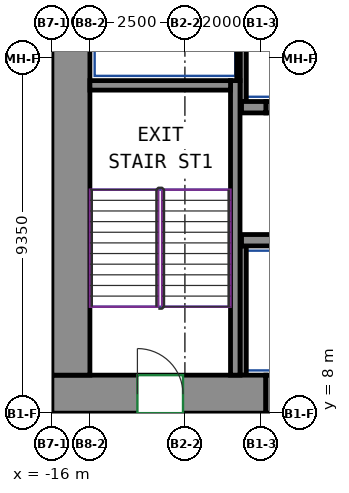
"""IFC4 building model, lengths in metres.
Left out: names, types, materials, properties, quantities, classifications, styles, units other than length and angle.
Written with IfcOpenShell. Run it as: python <this file> out.ifc"""

import sys

from ifc_helpers import new_model, si_unit, direction, frame, frame_2d, origin, place, context, subcontext, project, spatial, rectangle, extrude, source, transform, mapped, element, fill, save


model = new_model("IFC4")
c1 = context("Model", 3, precision=1e-05, world=origin(), true_north=direction((0.0, 1.0)))
c2 = subcontext(c1, "Body", "Model", "MODEL_VIEW")
j1 = project(units=[si_unit("LENGTHUNIT", "METRE"), si_unit("PLANEANGLEUNIT", "RADIAN")], contexts=[c1])
p1 = place(None, origin())
s1 = spatial("IfcSite", under=j1, at=p1, CompositionType="ELEMENT")
p2 = place(p1, origin())
s2 = spatial("IfcBuilding", under=s1, at=p2, CompositionType="ELEMENT")
p3 = place(p2, frame((0.0, 0.0, 91.2)))
s3 = spatial("IfcBuildingStorey", under=s2, at=p3, CompositionType="ELEMENT", Elevation=91.2)
m1 = source(origin(), c2, "Body", "SweptSolid", [
    extrude(rectangle(XDim=5.63, YDim=1.0, at=frame_2d((2.815, 0.0))), origin(), (0.0, 0.0, 1.0), 3.6),
])
p4 = place(p3, frame((-16.0, 8.5, 0.0), z_axis=(0.0, 0.0, 1.0), x_axis=(1.0, 0.0, 0.0)))
e1 = element("IfcWall", 1, at=p4, inside=s3, PredefinedType="SHEAR", context=c2, shape_type="MappedRepresentation", body=[
    mapped(m1, transform((0.0, 0.0, 0.0))),
])
p5 = place(p4, frame((2.25, 0.0, 0.0)))
e2 = element("IfcOpeningElement", 2, at=p5, cuts=e1, PredefinedType="OPENING", context=c2, shape_type="SweptSolid", body=[
    extrude(rectangle(XDim=1.2, YDim=2.1, at=frame_2d((0.6, 1.05))), frame((0.0, 0.51, 0.0), z_axis=(0.0, -1.0, 0.0), x_axis=(1.0, 0.0, 0.0)), (0.0, 0.0, 1.0), 1.02),
])
m2 = source(origin(), c2, "Body", "SweptSolid", [
    extrude(rectangle(XDim=12.0, YDim=1.0, at=frame_2d((6.0, 0.0))), origin(), (0.0, 0.0, 1.0), 3.6),
])
p6 = place(p3, frame((-15.5, 9.0, 0.0), z_axis=(0.0, 0.0, 1.0), x_axis=(0.0, 1.0, 0.0)))
e3 = element("IfcWall", 3, at=p6, inside=s3, PredefinedType="SHEAR", context=c2, shape_type="MappedRepresentation", body=[
    mapped(m2, transform((0.0, 0.0, 0.0))),
])
m3 = source(origin(), c2, "Body", "SweptSolid", [
    extrude(rectangle(XDim=7.75, YDim=0.25, at=frame_2d((3.875, 0.0))), origin(), (0.0, 0.0, 1.0), 3.6),
])
p7 = place(p3, frame((-11.175, 9.0, 0.0), z_axis=(0.0, 0.0, 1.0), x_axis=(0.0, 1.0, 0.0)))
e4 = element("IfcWall", 4, at=p7, inside=s3, PredefinedType="SHEAR", context=c2, shape_type="MappedRepresentation", body=[
    mapped(m3, transform((0.0, 0.0, 0.0))),
])
m4 = source(origin(), c2, "Body", "SweptSolid", [
    extrude(rectangle(XDim=3.7, YDim=0.25, at=frame_2d((1.85, 0.0))), origin(), (0.0, 0.0, 1.0), 3.6),
])
p8 = place(p3, frame((-15.0, 16.625, 0.0), z_axis=(0.0, 0.0, 1.0), x_axis=(1.0, 0.0, 0.0)))
e5 = element("IfcWall", 5, at=p8, inside=s3, PredefinedType="SHEAR", context=c2, shape_type="MappedRepresentation", body=[
    mapped(m4, transform((0.0, 0.0, 0.0))),
])
m5 = source(origin(), c2, "Body", "SweptSolid", [
    extrude(rectangle(XDim=6.0, YDim=0.3, at=frame_2d((3.0, 0.0))), origin(), (0.0, 0.0, 1.0), 3.6),
])
p9 = place(p3, frame((-11.01, 12.55, 0.0), z_axis=(0.0, 0.0, 1.0), x_axis=(1.0, 0.0, 0.0)))
e6 = element("IfcWall", 6, at=p9, inside=s3, PredefinedType="SHEAR", context=c2, shape_type="MappedRepresentation", body=[
    mapped(m5, transform((0.0, 0.0, 0.0))),
])
m6 = source(origin(), c2, "Body", "SweptSolid", [
    extrude(rectangle(XDim=0.64, YDim=0.3, at=frame_2d((0.32, 0.0))), origin(), (0.0, 0.0, 1.0), 3.6),
])
p10 = place(p3, frame((-11.01, 16.05, 0.0), z_axis=(0.0, 0.0, 1.0), x_axis=(1.0, 0.0, 0.0)))
e7 = element("IfcWall", 7, at=p10, inside=s3, PredefinedType="SHEAR", context=c2, shape_type="MappedRepresentation", body=[
    mapped(m6, transform((0.0, 0.0, 0.0))),
])
m7 = source(origin(), c2, "Body", "SweptSolid", [
    extrude(rectangle(XDim=1.4, YDim=0.3, at=frame_2d((0.7, 0.0))), origin(), (0.0, 0.0, 1.0), 3.6),
])
p11 = place(p3, frame((-10.37, 16.05, 0.0), z_axis=(0.0, 0.0, 1.0), x_axis=(1.0, 0.0, 0.0)))
e8 = element("IfcWall", 8, at=p11, inside=s3, PredefinedType="PARTITIONING", context=c2, shape_type="MappedRepresentation", body=[
    mapped(m7, transform((0.0, 0.0, 0.0))),
])
p12 = place(p11, frame((0.15, 0.0, 0.0)))
e9 = element("IfcOpeningElement", 9, at=p12, cuts=e8, PredefinedType="OPENING", context=c2, shape_type="SweptSolid", body=[
    extrude(rectangle(XDim=1.1, YDim=2.1, at=frame_2d((0.55, 1.05))), frame((0.0, 0.16, 0.0), z_axis=(0.0, -1.0, 0.0), x_axis=(1.0, 0.0, 0.0)), (0.0, 0.0, 1.0), 0.32),
])
m8 = source(origin(), c2, "Body", "SweptSolid", [
    extrude(rectangle(XDim=3.275, YDim=0.165, at=frame_2d((1.638, 0.0))), origin(), (0.0, 0.0, 1.0), 3.6),
])
p13 = place(p3, frame((-10.968, 16.2, 0.0), z_axis=(0.0, 0.0, 1.0), x_axis=(0.0, 1.0, 0.0)))
e10 = element("IfcWall", 10, at=p13, inside=s3, PredefinedType="PARTITIONING", context=c2, shape_type="MappedRepresentation", body=[
    mapped(m8, transform((0.0, 0.0, 0.0))),
])
m9 = source(origin(), c2, "Body", "SweptSolid", [
    extrude(rectangle(XDim=2.725, YDim=0.085, at=frame_2d((1.363, 0.0))), origin(), (0.0, 0.0, 1.0), 3.6),
])
p14 = place(p3, frame((-11.093, 16.75, 0.0), z_axis=(0.0, 0.0, 1.0), x_axis=(0.0, 1.0, 0.0)))
e11 = element("IfcWall", 11, at=p14, inside=s3, PredefinedType="PARTITIONING", context=c2, shape_type="MappedRepresentation", body=[
    mapped(m9, transform((0.0, 0.0, 0.0))),
])
m10 = source(origin(), c2, "Body", "SweptSolid", [
    extrude(rectangle(XDim=3.4, YDim=0.165, at=frame_2d((1.7, 0.0))), origin(), (0.0, 0.0, 1.0), 3.6),
])
p15 = place(p3, frame((-10.968, 9.0, 0.0), z_axis=(0.0, 0.0, 1.0), x_axis=(0.0, 1.0, 0.0)))
e12 = element("IfcWall", 12, at=p15, inside=s3, PredefinedType="PARTITIONING", context=c2, shape_type="MappedRepresentation", body=[
    mapped(m10, transform((0.0, 0.0, 0.0))),
])
m11 = source(origin(), c2, "Body", "SweptSolid", [
    extrude(rectangle(XDim=1.4, YDim=1.0, at=frame_2d((0.7, 0.0))), origin(), (0.0, 0.0, 1.0), 2.7),
])
p16 = place(p3, frame((-10.37, 8.5, 0.0), z_axis=(0.0, 0.0, 1.0), x_axis=(1.0, 0.0, 0.0)))
e13 = element("IfcWall", 13, at=p16, inside=s3, PredefinedType="PARTITIONING", context=c2, shape_type="MappedRepresentation", body=[
    mapped(m11, transform((0.0, 0.0, 0.0))),
])
p17 = place(p16, frame((0.25, 0.0, 0.0)))
e14 = element("IfcOpeningElement", 14, at=p17, cuts=e13, PredefinedType="OPENING", context=c2, shape_type="SweptSolid", body=[
    extrude(rectangle(XDim=0.9, YDim=2.1, at=frame_2d((0.45, 1.05))), frame((0.0, 0.51, 0.0), z_axis=(0.0, -1.0, 0.0), x_axis=(1.0, 0.0, 0.0)), (0.0, 0.0, 1.0), 1.02),
])
p18 = place(p5, origin())
e15 = element("IfcDoor", 15, at=p18, inside=s3, OperationType="DOUBLE_DOOR_SINGLE_SWING", PredefinedType="DOOR", context=c2, shape_type="SweptSolid", body=[
    extrude(rectangle(XDim=1.2, YDim=2.1, at=frame_2d((0.6, 1.05))), frame((0.0, 0.405, 0.0), z_axis=(0.0, -1.0, 0.0), x_axis=(1.0, 0.0, 0.0)), (0.0, 0.0, 1.0), 0.05),
])
fill(e2, e15)
save(model, sys.argv[1])
